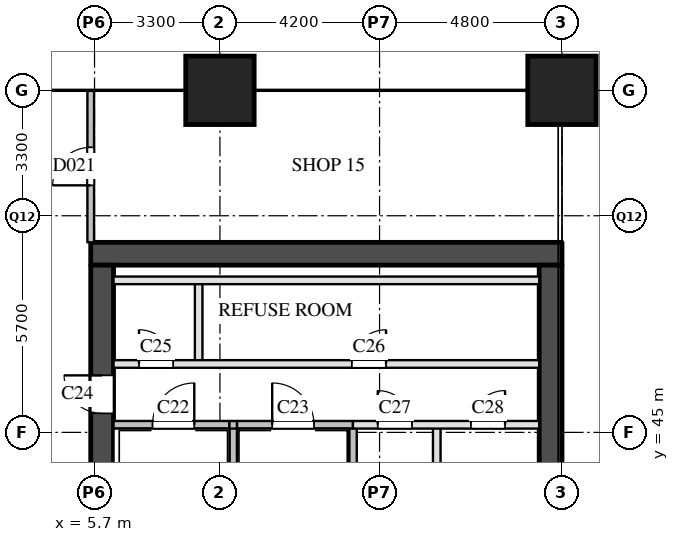
"""IFC4 building model, lengths in metres.
Left out: names, types, materials, properties, quantities, classifications, styles, units other than length and angle.
Written with IfcOpenShell. Run it as: python <this file> out.ifc"""

import sys

from ifc_helpers import new_model, si_unit, direction, frame, frame_2d, origin, origin_2d, place, context, subcontext, project, spatial, rectangle, extrude, element, fill, save


model = new_model("IFC4")
c1 = context("Model", 3, precision=1e-05, world=origin(), true_north=direction((0.0, 1.0)))
c2 = subcontext(c1, "Body", "Model", "MODEL_VIEW")
j1 = project(units=[si_unit("LENGTHUNIT", "METRE"), si_unit("PLANEANGLEUNIT", "RADIAN")], contexts=[c1])
p1 = place(None, origin())
s1 = spatial("IfcSite", under=j1, at=p1, CompositionType="ELEMENT")
p2 = place(p1, origin())
s2 = spatial("IfcBuilding", under=s1, at=p2, CompositionType="ELEMENT")
p3 = place(p2, frame((0.0, 0.0, 21.0)))
s3 = spatial("IfcBuildingStorey", under=s2, at=p3, CompositionType="ELEMENT", Elevation=21.0)
for number, where, z_axis, x_axis in (
    (1, (9.0, 54.0, 0.0), (0.0, 0.0, 1.0), (1.0, 0.0, 0.0)),
    (2, (18.0, 54.0, 0.0), (0.0, 0.0, 1.0), (1.0, 0.0, 0.0)),
):
    element("IfcColumn", number, at=place(p3, frame(where, z_axis=z_axis, x_axis=x_axis)), inside=s3, PredefinedType="COLUMN", context=c2, shape_type="SweptSolid", body=[
        extrude(rectangle(XDim=1.8, YDim=1.8, at=origin_2d()), origin(), (0.0, 0.0, 1.0), 5.0),
    ])
p4 = place(p3, frame((5.6, 49.7, 0.0), z_axis=(0.0, 0.0, 1.0), x_axis=(1.0, 0.0, 0.0)))
e3 = element("IfcWall", 3, at=p4, inside=s3, PredefinedType="SHEAR", context=c2, shape_type="SweptSolid", body=[
    extrude(rectangle(XDim=12.4, YDim=0.6, at=frame_2d((6.2, 0.0))), origin(), (0.0, 0.0, 1.0), 4.55),
])
p5 = place(p3, frame((5.9, 29.1, 0.0), z_axis=(0.0, 0.0, 1.0), x_axis=(0.0, 1.0, 0.0)))
e4 = element("IfcWall", 4, at=p5, inside=s3, PredefinedType="SHEAR", context=c2, shape_type="SweptSolid", body=[
    extrude(rectangle(XDim=20.3, YDim=0.6, at=frame_2d((10.15, 0.0))), origin(), (0.0, 0.0, 1.0), 4.55),
])
p6 = place(p5, frame((3.6, 0.0, 0.0)))
e5 = element("IfcOpeningElement", 5, at=p6, cuts=e4, PredefinedType="OPENING", context=c2, shape_type="SweptSolid", body=[
    extrude(rectangle(XDim=1.8, YDim=2.1, at=frame_2d((0.9, 1.05))), frame((0.0, 0.31, 0.0), z_axis=(0.0, -1.0, 0.0), x_axis=(1.0, 0.0, 0.0)), (0.0, 0.0, 1.0), 0.62),
])
p7 = place(p5, frame((16.4, 0.0, 0.0)))
e6 = element("IfcOpeningElement", 6, at=p7, cuts=e4, PredefinedType="OPENING", context=c2, shape_type="SweptSolid", body=[
    extrude(rectangle(XDim=1.0, YDim=2.1, at=frame_2d((0.5, 1.05))), frame((0.0, 0.31, 0.0), z_axis=(0.0, -1.0, 0.0), x_axis=(1.0, 0.0, 0.0)), (0.0, 0.0, 1.0), 0.62),
])
p8 = place(p3, frame((17.7, 29.1, 0.0), z_axis=(0.0, 0.0, 1.0), x_axis=(0.0, 1.0, 0.0)))
e7 = element("IfcWall", 7, at=p8, inside=s3, PredefinedType="SHEAR", context=c2, shape_type="SweptSolid", body=[
    extrude(rectangle(XDim=20.3, YDim=0.6, at=frame_2d((10.15, 0.0))), origin(), (0.0, 0.0, 1.0), 4.55),
])
p9 = place(p3, frame((8.44, 46.8, 0.0), z_axis=(0.0, 0.0, 1.0), x_axis=(0.0, 1.0, 0.0)))
e8 = element("IfcWall", 8, at=p9, inside=s3, PredefinedType="PARTITIONING", context=c2, shape_type="SweptSolid", body=[
    extrude(rectangle(XDim=2.2, YDim=0.2, at=frame_2d((1.1, 0.0))), origin(), (0.0, 0.0, 1.0), 4.55),
])
for number, where, z_axis, x_axis in (
    (9, (9.35, 43.7, 0.0), (0.0, 0.0, 1.0), (0.0, 1.0, 0.0)),
    (10, (12.5, 43.7, 0.0), (0.0, 0.0, 1.0), (0.0, 1.0, 0.0)),
):
    element("IfcWall", number, at=place(p3, frame(where, z_axis=z_axis, x_axis=x_axis)), inside=s3, PredefinedType="SOLIDWALL", context=c2, shape_type="SweptSolid", body=[
        extrude(rectangle(XDim=1.5, YDim=0.2, at=frame_2d((0.75, 0.0))), origin(), (0.0, 0.0, 1.0), 4.55),
    ])
p10 = place(p3, frame((14.705, 39.0, 0.0), z_axis=(0.0, 0.0, 1.0), x_axis=(0.0, 1.0, 0.0)))
e11 = element("IfcWall", 11, at=p10, inside=s3, PredefinedType="PARTITIONING", context=c2, shape_type="SweptSolid", body=[
    extrude(rectangle(XDim=6.2, YDim=0.2, at=frame_2d((3.1, 0.0))), origin(), (0.0, 0.0, 1.0), 4.55),
])
p11 = place(p3, frame((12.5, 45.2, 0.0), z_axis=(0.0, 0.0, 1.0), x_axis=(1.0, 0.0, 0.0)))
e12 = element("IfcWall", 12, at=p11, inside=s3, PredefinedType="PARTITIONING", context=c2, shape_type="SweptSolid", body=[
    extrude(rectangle(XDim=4.9, YDim=0.2, at=frame_2d((2.45, 0.0))), origin(), (0.0, 0.0, 1.0), 4.55),
])
p12 = place(p11, frame((0.653, 0.0, 0.0)))
e13 = element("IfcOpeningElement", 13, at=p12, cuts=e12, PredefinedType="OPENING", context=c2, shape_type="SweptSolid", body=[
    extrude(rectangle(XDim=0.9, YDim=2.1, at=frame_2d((0.45, 1.05))), frame((0.0, 0.11, 0.0), z_axis=(0.0, -1.0, 0.0), x_axis=(1.0, 0.0, 0.0)), (0.0, 0.0, 1.0), 0.22),
])
p13 = place(p11, frame((3.103, 0.0, 0.0)))
e14 = element("IfcOpeningElement", 14, at=p13, cuts=e12, PredefinedType="OPENING", context=c2, shape_type="SweptSolid", body=[
    extrude(rectangle(XDim=0.9, YDim=2.1, at=frame_2d((0.45, 1.05))), frame((0.0, 0.11, 0.0), z_axis=(0.0, -1.0, 0.0), x_axis=(1.0, 0.0, 0.0)), (0.0, 0.0, 1.0), 0.22),
])
p14 = place(p3, frame((6.2, 45.2, 0.0), z_axis=(0.0, 0.0, 1.0), x_axis=(1.0, 0.0, 0.0)))
e15 = element("IfcWall", 15, at=p14, inside=s3, PredefinedType="SOLIDWALL", context=c2, shape_type="SweptSolid", body=[
    extrude(rectangle(XDim=3.05, YDim=0.2, at=frame_2d((1.525, 0.0))), origin(), (0.0, 0.0, 1.0), 4.55),
])
p15 = place(p14, frame((1.025, 0.0, 0.0)))
e16 = element("IfcOpeningElement", 16, at=p15, cuts=e15, PredefinedType="OPENING", context=c2, shape_type="SweptSolid", body=[
    extrude(rectangle(XDim=1.1, YDim=2.1, at=frame_2d((0.55, 1.05))), frame((0.0, 0.11, 0.0), z_axis=(0.0, -1.0, 0.0), x_axis=(1.0, 0.0, 0.0)), (0.0, 0.0, 1.0), 0.22),
])
p16 = place(p3, frame((9.25, 45.2, 0.0), z_axis=(0.0, 0.0, 1.0), x_axis=(1.0, 0.0, 0.0)))
e17 = element("IfcWall", 17, at=p16, inside=s3, PredefinedType="SOLIDWALL", context=c2, shape_type="SweptSolid", body=[
    extrude(rectangle(XDim=0.2, YDim=0.2, at=frame_2d((0.1, 0.0))), origin(), (0.0, 0.0, 1.0), 4.55),
])
p17 = place(p3, frame((9.45, 45.2, 0.0), z_axis=(0.0, 0.0, 1.0), x_axis=(1.0, 0.0, 0.0)))
e18 = element("IfcWall", 18, at=p17, inside=s3, PredefinedType="SOLIDWALL", context=c2, shape_type="SweptSolid", body=[
    extrude(rectangle(XDim=3.05, YDim=0.2, at=frame_2d((1.525, 0.0))), origin(), (0.0, 0.0, 1.0), 4.55),
])
p18 = place(p17, frame((0.925, 0.0, 0.0)))
e19 = element("IfcOpeningElement", 19, at=p18, cuts=e18, PredefinedType="OPENING", context=c2, shape_type="SweptSolid", body=[
    extrude(rectangle(XDim=1.1, YDim=2.1, at=frame_2d((0.55, 1.05))), frame((0.0, 0.11, 0.0), z_axis=(0.0, -1.0, 0.0), x_axis=(1.0, 0.0, 0.0)), (0.0, 0.0, 1.0), 0.22),
])
p19 = place(p3, frame((6.2, 46.8, 0.0), z_axis=(0.0, 0.0, 1.0), x_axis=(1.0, 0.0, 0.0)))
e20 = element("IfcWall", 20, at=p19, inside=s3, PredefinedType="PARTITIONING", context=c2, shape_type="SweptSolid", body=[
    extrude(rectangle(XDim=11.2, YDim=0.2, at=frame_2d((5.6, 0.0))), origin(), (0.0, 0.0, 1.0), 4.55),
])
p20 = place(p19, frame((0.67, 0.0, 0.0)))
e21 = element("IfcOpeningElement", 21, at=p20, cuts=e20, PredefinedType="OPENING", context=c2, shape_type="SweptSolid", body=[
    extrude(rectangle(XDim=0.9, YDim=2.1, at=frame_2d((0.45, 1.05))), frame((0.0, 0.11, 0.0), z_axis=(0.0, -1.0, 0.0), x_axis=(1.0, 0.0, 0.0)), (0.0, 0.0, 1.0), 0.22),
])
p21 = place(p19, frame((6.27, 0.0, 0.0)))
e22 = element("IfcOpeningElement", 22, at=p21, cuts=e20, PredefinedType="OPENING", context=c2, shape_type="SweptSolid", body=[
    extrude(rectangle(XDim=0.9, YDim=2.1, at=frame_2d((0.45, 1.05))), frame((0.0, 0.11, 0.0), z_axis=(0.0, -1.0, 0.0), x_axis=(1.0, 0.0, 0.0)), (0.0, 0.0, 1.0), 0.22),
])
p22 = place(p3, frame((6.2, 49.0, 0.0), z_axis=(0.0, 0.0, 1.0), x_axis=(1.0, 0.0, 0.0)))
e23 = element("IfcWall", 23, at=p22, inside=s3, PredefinedType="PARTITIONING", context=c2, shape_type="SweptSolid", body=[
    extrude(rectangle(XDim=11.2, YDim=0.2, at=frame_2d((5.6, 0.0))), origin(), (0.0, 0.0, 1.0), 4.55),
])
p23 = place(p3, frame((5.6, 50.0, 0.0), z_axis=(0.0, 0.0, 1.0), x_axis=(0.0, 1.0, 0.0)))
e24 = element("IfcWall", 24, at=p23, inside=s3, PredefinedType="PARTITIONING", context=c2, shape_type="SweptSolid", body=[
    extrude(rectangle(XDim=4.0, YDim=0.175, at=frame_2d((2.0, 0.0))), origin(), (0.0, 0.0, 1.0), 3.55),
])
p24 = place(p23, frame((1.5, 0.0, 0.0)))
e25 = element("IfcOpeningElement", 25, at=p24, cuts=e24, PredefinedType="OPENING", context=c2, shape_type="SweptSolid", body=[
    extrude(rectangle(XDim=1.0, YDim=2.1, at=frame_2d((0.5, 1.05))), frame((0.0, 0.097, 0.0), z_axis=(0.0, -1.0, 0.0), x_axis=(1.0, 0.0, 0.0)), (0.0, 0.0, 1.0), 0.195),
])
p25 = place(p15, origin())
e26 = element("IfcDoor", 26, at=p25, inside=s3, OperationType="SINGLE_SWING_RIGHT", PredefinedType="DOOR", context=c2, shape_type="SweptSolid", body=[
    extrude(rectangle(XDim=1.1, YDim=2.1, at=frame_2d((0.55, 1.05))), frame((0.0, 0.025, 0.0), z_axis=(0.0, -1.0, 0.0), x_axis=(1.0, 0.0, 0.0)), (0.0, 0.0, 1.0), 0.05),
])
fill(e16, e26)
p26 = place(p18, origin())
e27 = element("IfcDoor", 27, at=p26, inside=s3, OperationType="SINGLE_SWING_LEFT", PredefinedType="DOOR", context=c2, shape_type="SweptSolid", body=[
    extrude(rectangle(XDim=1.1, YDim=2.1, at=frame_2d((0.55, 1.05))), frame((0.0, 0.025, 0.0), z_axis=(0.0, -1.0, 0.0), x_axis=(1.0, 0.0, 0.0)), (0.0, 0.0, 1.0), 0.05),
])
fill(e19, e27)
p27 = place(p7, origin())
e28 = element("IfcDoor", 28, at=p27, inside=s3, OperationType="SINGLE_SWING_RIGHT", PredefinedType="DOOR", context=c2, shape_type="SweptSolid", body=[
    extrude(rectangle(XDim=1.0, YDim=2.1, at=frame_2d((0.5, 1.05))), frame((0.0, 0.025, 0.0), z_axis=(0.0, -1.0, 0.0), x_axis=(1.0, 0.0, 0.0)), (0.0, 0.0, 1.0), 0.05),
])
fill(e6, e28)
p28 = place(p20, origin())
e29 = element("IfcDoor", 29, at=p28, inside=s3, OperationType="SINGLE_SWING_LEFT", PredefinedType="DOOR", context=c2, shape_type="SweptSolid", body=[
    extrude(rectangle(XDim=0.9, YDim=2.1, at=frame_2d((0.45, 1.05))), frame((0.0, 0.025, 0.0), z_axis=(0.0, -1.0, 0.0), x_axis=(1.0, 0.0, 0.0)), (0.0, 0.0, 1.0), 0.05),
])
fill(e21, e29)
p29 = place(p21, origin())
e30 = element("IfcDoor", 30, at=p29, inside=s3, OperationType="SINGLE_SWING_RIGHT", PredefinedType="DOOR", context=c2, shape_type="SweptSolid", body=[
    extrude(rectangle(XDim=0.9, YDim=2.1, at=frame_2d((0.45, 1.05))), frame((0.0, 0.025, 0.0), z_axis=(0.0, -1.0, 0.0), x_axis=(1.0, 0.0, 0.0)), (0.0, 0.0, 1.0), 0.05),
])
fill(e22, e30)
p30 = place(p12, origin())
e31 = element("IfcDoor", 31, at=p30, inside=s3, OperationType="SINGLE_SWING_LEFT", PredefinedType="DOOR", context=c2, shape_type="SweptSolid", body=[
    extrude(rectangle(XDim=0.9, YDim=2.1, at=frame_2d((0.45, 1.05))), frame((0.0, 0.025, 0.0), z_axis=(0.0, -1.0, 0.0), x_axis=(1.0, 0.0, 0.0)), (0.0, 0.0, 1.0), 0.05),
])
fill(e13, e31)
p31 = place(p13, origin())
e32 = element("IfcDoor", 32, at=p31, inside=s3, OperationType="SINGLE_SWING_RIGHT", PredefinedType="DOOR", context=c2, shape_type="SweptSolid", body=[
    extrude(rectangle(XDim=0.9, YDim=2.1, at=frame_2d((0.45, 1.05))), frame((0.0, 0.025, 0.0), z_axis=(0.0, -1.0, 0.0), x_axis=(1.0, 0.0, 0.0)), (0.0, 0.0, 1.0), 0.05),
])
fill(e14, e32)
p32 = place(p24, origin())
e33 = element("IfcDoor", 33, at=p32, inside=s3, OperationType="SINGLE_SWING_LEFT", PredefinedType="DOOR", context=c2, shape_type="SweptSolid", body=[
    extrude(rectangle(XDim=1.0, YDim=2.1, at=frame_2d((0.5, 1.05))), frame((0.0, 0.025, 0.0), z_axis=(0.0, -1.0, 0.0), x_axis=(1.0, 0.0, 0.0)), (0.0, 0.0, 1.0), 0.05),
])
fill(e25, e33)
save(model, sys.argv[1])
